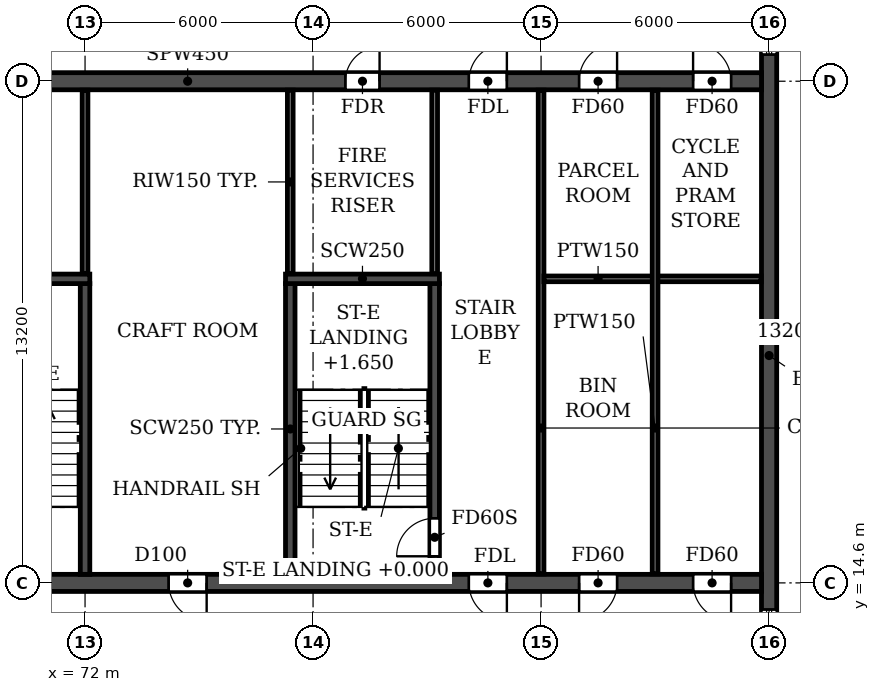
"""IFC4 building model, lengths in metres.
Left out: names, types, materials, properties, quantities, classifications, styles, units other than length and angle.
Written with IfcOpenShell. Run it as: python <this file> out.ifc"""

import sys

from ifc_helpers import new_model, si_unit, direction, frame, frame_2d, origin, place, context, subcontext, project, spatial, rectangle, extrude, element, fill, save


model = new_model("IFC4")
c1 = context("Model", 3, precision=1e-05, world=origin(), true_north=direction((0.0, 1.0)))
c2 = subcontext(c1, "Body", "Model", "MODEL_VIEW")
j1 = project(units=[si_unit("LENGTHUNIT", "METRE"), si_unit("PLANEANGLEUNIT", "RADIAN")], contexts=[c1])
p1 = place(None, origin())
s1 = spatial("IfcSite", under=j1, at=p1, CompositionType="ELEMENT")
p2 = place(p1, origin())
s2 = spatial("IfcBuilding", under=s1, at=p2, CompositionType="ELEMENT")
p3 = place(p2, frame((0.0, 0.0, 122.4)))
s3 = spatial("IfcBuildingStorey", under=s2, at=p3, CompositionType="ELEMENT", Elevation=122.4)
p4 = place(p3, frame((90.0, 4.683, 0.0), z_axis=(0.0, 0.0, 1.0), x_axis=(0.0, 1.0, 0.0)))
e1 = element("IfcWall", 1, at=p4, inside=s3, PredefinedType="SHEAR", context=c2, shape_type="SweptSolid", body=[
    extrude(rectangle(XDim=33.034, YDim=0.4, at=frame_2d((16.517, 0.0))), origin(), (0.0, 0.0, 1.0), 3.07),
])
p5 = place(p4, frame((23.817, 0.0, 0.9)))
e2 = element("IfcOpeningElement", 2, at=p5, cuts=e1, PredefinedType="OPENING", context=c2, shape_type="SweptSolid", body=[
    extrude(rectangle(XDim=1.2, YDim=1.5, at=frame_2d((0.6, 0.75))), frame((0.0, 0.21, 0.0), z_axis=(0.0, -1.0, 0.0), x_axis=(1.0, 0.0, 0.0)), (0.0, 0.0, 1.0), 0.42),
])
p6 = place(p4, frame((8.017, 0.0, 0.9)))
e3 = element("IfcOpeningElement", 3, at=p6, cuts=e1, PredefinedType="OPENING", context=c2, shape_type="SweptSolid", body=[
    extrude(rectangle(XDim=1.2, YDim=1.5, at=frame_2d((0.6, 0.75))), frame((0.0, 0.21, 0.0), z_axis=(0.0, -1.0, 0.0), x_axis=(1.0, 0.0, 0.0)), (0.0, 0.0, 1.0), 0.42),
])
p7 = place(p4, frame((28.293, 0.0, 0.6)))
e4 = element("IfcOpeningElement", 4, at=p7, cuts=e1, PredefinedType="OPENING", context=c2, shape_type="SweptSolid", body=[
    extrude(rectangle(XDim=2.2, YDim=1.8, at=frame_2d((1.1, 0.9))), frame((0.0, 0.21, 0.0), z_axis=(0.0, -1.0, 0.0), x_axis=(1.0, 0.0, 0.0)), (0.0, 0.0, 1.0), 0.42),
])
p8 = place(p4, frame((2.541, 0.0, 0.6)))
e5 = element("IfcOpeningElement", 5, at=p8, cuts=e1, PredefinedType="OPENING", context=c2, shape_type="SweptSolid", body=[
    extrude(rectangle(XDim=2.2, YDim=1.8, at=frame_2d((1.1, 0.9))), frame((0.0, 0.21, 0.0), z_axis=(0.0, -1.0, 0.0), x_axis=(1.0, 0.0, 0.0)), (0.0, 0.0, 1.0), 0.42),
])
p9 = place(p3, frame((12.2, 14.6, 0.0), z_axis=(0.0, 0.0, 1.0), x_axis=(1.0, 0.0, 0.0)))
e6 = element("IfcWall", 6, at=p9, inside=s3, PredefinedType="SOLIDWALL", context=c2, shape_type="SweptSolid", body=[
    extrude(rectangle(XDim=77.6, YDim=0.45, at=frame_2d((38.8, 0.0))), origin(), (0.0, 0.0, 1.0), 3.07),
])
p10 = place(p9, frame((0.8, 0.0, 0.0)))
e7 = element("IfcOpeningElement", 7, at=p10, cuts=e6, PredefinedType="OPENING", context=c2, shape_type="SweptSolid", body=[
    extrude(rectangle(XDim=1.0, YDim=2.1, at=frame_2d((0.5, 1.05))), frame((0.0, 0.235, 0.0), z_axis=(0.0, -1.0, 0.0), x_axis=(1.0, 0.0, 0.0)), (0.0, 0.0, 1.0), 0.47),
])
p11 = place(p9, frame((3.8, 0.0, 0.0)))
e8 = element("IfcOpeningElement", 8, at=p11, cuts=e6, PredefinedType="OPENING", context=c2, shape_type="SweptSolid", body=[
    extrude(rectangle(XDim=1.0, YDim=2.1, at=frame_2d((0.5, 1.05))), frame((0.0, 0.235, 0.0), z_axis=(0.0, -1.0, 0.0), x_axis=(1.0, 0.0, 0.0)), (0.0, 0.0, 1.0), 0.47),
])
p12 = place(p9, frame((6.7, 0.0, 0.0)))
e9 = element("IfcOpeningElement", 9, at=p12, cuts=e6, PredefinedType="OPENING", context=c2, shape_type="SweptSolid", body=[
    extrude(rectangle(XDim=1.0, YDim=2.1, at=frame_2d((0.5, 1.05))), frame((0.0, 0.235, 0.0), z_axis=(0.0, -1.0, 0.0), x_axis=(1.0, 0.0, 0.0)), (0.0, 0.0, 1.0), 0.47),
])
p13 = place(p9, frame((14.6, 0.0, 0.0)))
e10 = element("IfcOpeningElement", 10, at=p13, cuts=e6, PredefinedType="OPENING", context=c2, shape_type="SweptSolid", body=[
    extrude(rectangle(XDim=1.0, YDim=2.1, at=frame_2d((0.5, 1.05))), frame((0.0, 0.235, 0.0), z_axis=(0.0, -1.0, 0.0), x_axis=(1.0, 0.0, 0.0)), (0.0, 0.0, 1.0), 0.47),
])
p14 = place(p9, frame((19.2, 0.0, 0.0)))
e11 = element("IfcOpeningElement", 11, at=p14, cuts=e6, PredefinedType="OPENING", context=c2, shape_type="SweptSolid", body=[
    extrude(rectangle(XDim=1.0, YDim=2.1, at=frame_2d((0.5, 1.05))), frame((0.0, 0.235, 0.0), z_axis=(0.0, -1.0, 0.0), x_axis=(1.0, 0.0, 0.0)), (0.0, 0.0, 1.0), 0.47),
])
p15 = place(p9, frame((30.5, 0.0, 0.0)))
e12 = element("IfcOpeningElement", 12, at=p15, cuts=e6, PredefinedType="OPENING", context=c2, shape_type="SweptSolid", body=[
    extrude(rectangle(XDim=1.0, YDim=2.1, at=frame_2d((0.5, 1.05))), frame((0.0, 0.235, 0.0), z_axis=(0.0, -1.0, 0.0), x_axis=(1.0, 0.0, 0.0)), (0.0, 0.0, 1.0), 0.47),
])
p16 = place(p9, frame((34.4, 0.0, 0.0)))
e13 = element("IfcOpeningElement", 13, at=p16, cuts=e6, PredefinedType="OPENING", context=c2, shape_type="SweptSolid", body=[
    extrude(rectangle(XDim=1.0, YDim=2.1, at=frame_2d((0.5, 1.05))), frame((0.0, 0.235, 0.0), z_axis=(0.0, -1.0, 0.0), x_axis=(1.0, 0.0, 0.0)), (0.0, 0.0, 1.0), 0.47),
])
p17 = place(p9, frame((38.3, 0.0, 0.0)))
e14 = element("IfcOpeningElement", 14, at=p17, cuts=e6, PredefinedType="OPENING", context=c2, shape_type="SweptSolid", body=[
    extrude(rectangle(XDim=1.0, YDim=2.1, at=frame_2d((0.5, 1.05))), frame((0.0, 0.235, 0.0), z_axis=(0.0, -1.0, 0.0), x_axis=(1.0, 0.0, 0.0)), (0.0, 0.0, 1.0), 0.47),
])
p18 = place(p9, frame((40.9, 0.0, 0.0)))
e15 = element("IfcOpeningElement", 15, at=p18, cuts=e6, PredefinedType="OPENING", context=c2, shape_type="SweptSolid", body=[
    extrude(rectangle(XDim=1.0, YDim=2.1, at=frame_2d((0.5, 1.05))), frame((0.0, 0.235, 0.0), z_axis=(0.0, -1.0, 0.0), x_axis=(1.0, 0.0, 0.0)), (0.0, 0.0, 1.0), 0.47),
])
p19 = place(p9, frame((44.8, 0.0, 0.0)))
e16 = element("IfcOpeningElement", 16, at=p19, cuts=e6, PredefinedType="OPENING", context=c2, shape_type="SweptSolid", body=[
    extrude(rectangle(XDim=1.0, YDim=2.1, at=frame_2d((0.5, 1.05))), frame((0.0, 0.235, 0.0), z_axis=(0.0, -1.0, 0.0), x_axis=(1.0, 0.0, 0.0)), (0.0, 0.0, 1.0), 0.47),
])
p20 = place(p9, frame((57.4, 0.0, 0.0)))
e17 = element("IfcOpeningElement", 17, at=p20, cuts=e6, PredefinedType="OPENING", context=c2, shape_type="SweptSolid", body=[
    extrude(rectangle(XDim=1.0, YDim=2.1, at=frame_2d((0.5, 1.05))), frame((0.0, 0.235, 0.0), z_axis=(0.0, -1.0, 0.0), x_axis=(1.0, 0.0, 0.0)), (0.0, 0.0, 1.0), 0.47),
])
p21 = place(p9, frame((62.0, 0.0, 0.0)))
e18 = element("IfcOpeningElement", 18, at=p21, cuts=e6, PredefinedType="OPENING", context=c2, shape_type="SweptSolid", body=[
    extrude(rectangle(XDim=1.0, YDim=2.1, at=frame_2d((0.5, 1.05))), frame((0.0, 0.235, 0.0), z_axis=(0.0, -1.0, 0.0), x_axis=(1.0, 0.0, 0.0)), (0.0, 0.0, 1.0), 0.47),
])
p22 = place(p9, frame((69.9, 0.0, 0.0)))
e19 = element("IfcOpeningElement", 19, at=p22, cuts=e6, PredefinedType="OPENING", context=c2, shape_type="SweptSolid", body=[
    extrude(rectangle(XDim=1.0, YDim=2.1, at=frame_2d((0.5, 1.05))), frame((0.0, 0.235, 0.0), z_axis=(0.0, -1.0, 0.0), x_axis=(1.0, 0.0, 0.0)), (0.0, 0.0, 1.0), 0.47),
])
p23 = place(p9, frame((72.8, 0.0, 0.0)))
e20 = element("IfcOpeningElement", 20, at=p23, cuts=e6, PredefinedType="OPENING", context=c2, shape_type="SweptSolid", body=[
    extrude(rectangle(XDim=1.0, YDim=2.1, at=frame_2d((0.5, 1.05))), frame((0.0, 0.235, 0.0), z_axis=(0.0, -1.0, 0.0), x_axis=(1.0, 0.0, 0.0)), (0.0, 0.0, 1.0), 0.47),
])
p24 = place(p9, frame((75.8, 0.0, 0.0)))
e21 = element("IfcOpeningElement", 21, at=p24, cuts=e6, PredefinedType="OPENING", context=c2, shape_type="SweptSolid", body=[
    extrude(rectangle(XDim=1.0, YDim=2.1, at=frame_2d((0.5, 1.05))), frame((0.0, 0.235, 0.0), z_axis=(0.0, -1.0, 0.0), x_axis=(1.0, 0.0, 0.0)), (0.0, 0.0, 1.0), 0.47),
])
p25 = place(p3, frame((12.2, 27.8, 0.0), z_axis=(0.0, 0.0, 1.0), x_axis=(1.0, 0.0, 0.0)))
e22 = element("IfcWall", 22, at=p25, inside=s3, PredefinedType="SOLIDWALL", context=c2, shape_type="SweptSolid", body=[
    extrude(rectangle(XDim=77.6, YDim=0.45, at=frame_2d((38.8, 0.0))), origin(), (0.0, 0.0, 1.0), 3.07),
])
p26 = place(p25, frame((0.8, 0.0, 0.0)))
e23 = element("IfcOpeningElement", 23, at=p26, cuts=e22, PredefinedType="OPENING", context=c2, shape_type="SweptSolid", body=[
    extrude(rectangle(XDim=1.0, YDim=2.1, at=frame_2d((0.5, 1.05))), frame((0.0, 0.235, 0.0), z_axis=(0.0, -1.0, 0.0), x_axis=(1.0, 0.0, 0.0)), (0.0, 0.0, 1.0), 0.47),
])
p27 = place(p25, frame((3.8, 0.0, 0.0)))
e24 = element("IfcOpeningElement", 24, at=p27, cuts=e22, PredefinedType="OPENING", context=c2, shape_type="SweptSolid", body=[
    extrude(rectangle(XDim=1.0, YDim=2.1, at=frame_2d((0.5, 1.05))), frame((0.0, 0.235, 0.0), z_axis=(0.0, -1.0, 0.0), x_axis=(1.0, 0.0, 0.0)), (0.0, 0.0, 1.0), 0.47),
])
p28 = place(p25, frame((6.7, 0.0, 0.0)))
e25 = element("IfcOpeningElement", 25, at=p28, cuts=e22, PredefinedType="OPENING", context=c2, shape_type="SweptSolid", body=[
    extrude(rectangle(XDim=1.0, YDim=2.1, at=frame_2d((0.5, 1.05))), frame((0.0, 0.235, 0.0), z_axis=(0.0, -1.0, 0.0), x_axis=(1.0, 0.0, 0.0)), (0.0, 0.0, 1.0), 0.47),
])
p29 = place(p25, frame((10.05, 0.0, 0.0)))
e26 = element("IfcOpeningElement", 26, at=p29, cuts=e22, PredefinedType="OPENING", context=c2, shape_type="SweptSolid", body=[
    extrude(rectangle(XDim=0.9, YDim=2.1, at=frame_2d((0.45, 1.05))), frame((0.0, 0.235, 0.0), z_axis=(0.0, -1.0, 0.0), x_axis=(1.0, 0.0, 0.0)), (0.0, 0.0, 1.0), 0.47),
])
p30 = place(p25, frame((19.25, 0.0, 0.0)))
e27 = element("IfcOpeningElement", 27, at=p30, cuts=e22, PredefinedType="OPENING", context=c2, shape_type="SweptSolid", body=[
    extrude(rectangle(XDim=0.9, YDim=2.1, at=frame_2d((0.45, 1.05))), frame((0.0, 0.235, 0.0), z_axis=(0.0, -1.0, 0.0), x_axis=(1.0, 0.0, 0.0)), (0.0, 0.0, 1.0), 0.47),
])
p31 = place(p25, frame((25.0, 0.0, 0.0)))
e28 = element("IfcOpeningElement", 28, at=p31, cuts=e22, PredefinedType="OPENING", context=c2, shape_type="SweptSolid", body=[
    extrude(rectangle(XDim=1.0, YDim=2.1, at=frame_2d((0.5, 1.05))), frame((0.0, 0.235, 0.0), z_axis=(0.0, -1.0, 0.0), x_axis=(1.0, 0.0, 0.0)), (0.0, 0.0, 1.0), 0.47),
])
p32 = place(p25, frame((30.2, 0.0, 0.0)))
e29 = element("IfcOpeningElement", 29, at=p32, cuts=e22, PredefinedType="OPENING", context=c2, shape_type="SweptSolid", body=[
    extrude(rectangle(XDim=1.0, YDim=2.1, at=frame_2d((0.5, 1.05))), frame((0.0, 0.235, 0.0), z_axis=(0.0, -1.0, 0.0), x_axis=(1.0, 0.0, 0.0)), (0.0, 0.0, 1.0), 0.47),
])
p33 = place(p25, frame((35.4, 0.0, 0.0)))
e30 = element("IfcOpeningElement", 30, at=p33, cuts=e22, PredefinedType="OPENING", context=c2, shape_type="SweptSolid", body=[
    extrude(rectangle(XDim=1.0, YDim=2.1, at=frame_2d((0.5, 1.05))), frame((0.0, 0.235, 0.0), z_axis=(0.0, -1.0, 0.0), x_axis=(1.0, 0.0, 0.0)), (0.0, 0.0, 1.0), 0.47),
])
p34 = place(p25, frame((38.3, 0.0, 0.0)))
e31 = element("IfcOpeningElement", 31, at=p34, cuts=e22, PredefinedType="OPENING", context=c2, shape_type="SweptSolid", body=[
    extrude(rectangle(XDim=1.0, YDim=2.1, at=frame_2d((0.5, 1.05))), frame((0.0, 0.235, 0.0), z_axis=(0.0, -1.0, 0.0), x_axis=(1.0, 0.0, 0.0)), (0.0, 0.0, 1.0), 0.47),
])
p35 = place(p25, frame((41.2, 0.0, 0.0)))
e32 = element("IfcOpeningElement", 32, at=p35, cuts=e22, PredefinedType="OPENING", context=c2, shape_type="SweptSolid", body=[
    extrude(rectangle(XDim=1.0, YDim=2.1, at=frame_2d((0.5, 1.05))), frame((0.0, 0.235, 0.0), z_axis=(0.0, -1.0, 0.0), x_axis=(1.0, 0.0, 0.0)), (0.0, 0.0, 1.0), 0.47),
])
p36 = place(p25, frame((46.4, 0.0, 0.0)))
e33 = element("IfcOpeningElement", 33, at=p36, cuts=e22, PredefinedType="OPENING", context=c2, shape_type="SweptSolid", body=[
    extrude(rectangle(XDim=1.0, YDim=2.1, at=frame_2d((0.5, 1.05))), frame((0.0, 0.235, 0.0), z_axis=(0.0, -1.0, 0.0), x_axis=(1.0, 0.0, 0.0)), (0.0, 0.0, 1.0), 0.47),
])
p37 = place(p25, frame((51.6, 0.0, 0.0)))
e34 = element("IfcOpeningElement", 34, at=p37, cuts=e22, PredefinedType="OPENING", context=c2, shape_type="SweptSolid", body=[
    extrude(rectangle(XDim=1.0, YDim=2.1, at=frame_2d((0.5, 1.05))), frame((0.0, 0.235, 0.0), z_axis=(0.0, -1.0, 0.0), x_axis=(1.0, 0.0, 0.0)), (0.0, 0.0, 1.0), 0.47),
])
p38 = place(p25, frame((54.2, 0.0, 0.0)))
e35 = element("IfcOpeningElement", 35, at=p38, cuts=e22, PredefinedType="OPENING", context=c2, shape_type="SweptSolid", body=[
    extrude(rectangle(XDim=1.0, YDim=2.1, at=frame_2d((0.5, 1.05))), frame((0.0, 0.235, 0.0), z_axis=(0.0, -1.0, 0.0), x_axis=(1.0, 0.0, 0.0)), (0.0, 0.0, 1.0), 0.47),
])
p39 = place(p25, frame((57.45, 0.0, 0.0)))
e36 = element("IfcOpeningElement", 36, at=p39, cuts=e22, PredefinedType="OPENING", context=c2, shape_type="SweptSolid", body=[
    extrude(rectangle(XDim=0.9, YDim=2.1, at=frame_2d((0.45, 1.05))), frame((0.0, 0.235, 0.0), z_axis=(0.0, -1.0, 0.0), x_axis=(1.0, 0.0, 0.0)), (0.0, 0.0, 1.0), 0.47),
])
p40 = place(p25, frame((66.65, 0.0, 0.0)))
e37 = element("IfcOpeningElement", 37, at=p40, cuts=e22, PredefinedType="OPENING", context=c2, shape_type="SweptSolid", body=[
    extrude(rectangle(XDim=0.9, YDim=2.1, at=frame_2d((0.45, 1.05))), frame((0.0, 0.235, 0.0), z_axis=(0.0, -1.0, 0.0), x_axis=(1.0, 0.0, 0.0)), (0.0, 0.0, 1.0), 0.47),
])
p41 = place(p25, frame((69.9, 0.0, 0.0)))
e38 = element("IfcOpeningElement", 38, at=p41, cuts=e22, PredefinedType="OPENING", context=c2, shape_type="SweptSolid", body=[
    extrude(rectangle(XDim=1.0, YDim=2.1, at=frame_2d((0.5, 1.05))), frame((0.0, 0.235, 0.0), z_axis=(0.0, -1.0, 0.0), x_axis=(1.0, 0.0, 0.0)), (0.0, 0.0, 1.0), 0.47),
])
p42 = place(p25, frame((72.8, 0.0, 0.0)))
e39 = element("IfcOpeningElement", 39, at=p42, cuts=e22, PredefinedType="OPENING", context=c2, shape_type="SweptSolid", body=[
    extrude(rectangle(XDim=1.0, YDim=2.1, at=frame_2d((0.5, 1.05))), frame((0.0, 0.235, 0.0), z_axis=(0.0, -1.0, 0.0), x_axis=(1.0, 0.0, 0.0)), (0.0, 0.0, 1.0), 0.47),
])
p43 = place(p25, frame((75.8, 0.0, 0.0)))
e40 = element("IfcOpeningElement", 40, at=p43, cuts=e22, PredefinedType="OPENING", context=c2, shape_type="SweptSolid", body=[
    extrude(rectangle(XDim=1.0, YDim=2.1, at=frame_2d((0.5, 1.05))), frame((0.0, 0.235, 0.0), z_axis=(0.0, -1.0, 0.0), x_axis=(1.0, 0.0, 0.0)), (0.0, 0.0, 1.0), 0.47),
])
p44 = place(p3, frame((72.0, 14.825, 0.0), z_axis=(0.0, 0.0, 1.0), x_axis=(0.0, 1.0, 0.0)))
e41 = element("IfcWall", 41, at=p44, inside=s3, PredefinedType="SOLIDWALL", context=c2, shape_type="SweptSolid", body=[
    extrude(rectangle(XDim=7.65, YDim=0.25, at=frame_2d((3.825, 0.0))), origin(), (0.0, 0.0, 1.0), 3.07),
])
p45 = place(p3, frame((68.075, 22.6, 0.0), z_axis=(0.0, 0.0, 1.0), x_axis=(1.0, 0.0, 0.0)))
e42 = element("IfcWall", 42, at=p45, inside=s3, PredefinedType="SOLIDWALL", context=c2, shape_type="SweptSolid", body=[
    extrude(rectangle(XDim=4.05, YDim=0.25, at=frame_2d((2.025, 0.0))), origin(), (0.0, 0.0, 1.0), 3.07),
])
p46 = place(p3, frame((77.4, 14.825, 0.0), z_axis=(0.0, 0.0, 1.0), x_axis=(0.0, 1.0, 0.0)))
e43 = element("IfcWall", 43, at=p46, inside=s3, PredefinedType="SOLIDWALL", context=c2, shape_type="SweptSolid", body=[
    extrude(rectangle(XDim=7.65, YDim=0.25, at=frame_2d((3.825, 0.0))), origin(), (0.0, 0.0, 1.0), 3.07),
])
p47 = place(p3, frame((81.2, 14.825, 0.0), z_axis=(0.0, 0.0, 1.0), x_axis=(0.0, 1.0, 0.0)))
e44 = element("IfcWall", 44, at=p47, inside=s3, PredefinedType="SOLIDWALL", context=c2, shape_type="SweptSolid", body=[
    extrude(rectangle(XDim=7.65, YDim=0.25, at=frame_2d((3.825, 0.0))), origin(), (0.0, 0.0, 1.0), 3.07),
])
p48 = place(p47, frame((0.475, 0.0, 0.0)))
e45 = element("IfcOpeningElement", 45, at=p48, cuts=e44, PredefinedType="OPENING", context=c2, shape_type="SweptSolid", body=[
    extrude(rectangle(XDim=1.0, YDim=2.1, at=frame_2d((0.5, 1.05))), frame((0.0, 0.135, 0.0), z_axis=(0.0, -1.0, 0.0), x_axis=(1.0, 0.0, 0.0)), (0.0, 0.0, 1.0), 0.27),
])
p49 = place(p3, frame((77.275, 22.6, 0.0), z_axis=(0.0, 0.0, 1.0), x_axis=(1.0, 0.0, 0.0)))
e46 = element("IfcWall", 46, at=p49, inside=s3, PredefinedType="SOLIDWALL", context=c2, shape_type="SweptSolid", body=[
    extrude(rectangle(XDim=4.05, YDim=0.25, at=frame_2d((2.025, 0.0))), origin(), (0.0, 0.0, 1.0), 3.07),
])
p50 = place(p3, frame((84.0, 14.835, 0.0), z_axis=(0.0, 0.0, 1.0), x_axis=(0.0, 1.0, 0.0)))
e47 = element("IfcWall", 47, at=p50, inside=s3, PredefinedType="PARTITIONING", context=c2, shape_type="SweptSolid", body=[
    extrude(rectangle(XDim=12.73, YDim=0.15, at=frame_2d((6.365, 0.0))), origin(), (0.0, 0.0, 1.0), 3.07),
])
p51 = place(p3, frame((84.075, 22.6, 0.0), z_axis=(0.0, 0.0, 1.0), x_axis=(1.0, 0.0, 0.0)))
e48 = element("IfcWall", 48, at=p51, inside=s3, PredefinedType="PARTITIONING", context=c2, shape_type="SweptSolid", body=[
    extrude(rectangle(XDim=5.715, YDim=0.15, at=frame_2d((2.857, 0.0))), origin(), (0.0, 0.0, 1.0), 3.07),
])
p52 = place(p3, frame((87.0, 14.835, 0.0), z_axis=(0.0, 0.0, 1.0), x_axis=(0.0, 1.0, 0.0)))
e49 = element("IfcWall", 49, at=p52, inside=s3, PredefinedType="PARTITIONING", context=c2, shape_type="SweptSolid", body=[
    extrude(rectangle(XDim=12.73, YDim=0.15, at=frame_2d((6.365, 0.0))), origin(), (0.0, 0.0, 1.0), 3.07),
])
for number, where, z_axis, x_axis in (
    (50, (72.0, 22.735, 0.0), (0.0, 0.0, 1.0), (0.0, 1.0, 0.0)),
    (51, (77.4, 22.735, 0.0), (0.0, 0.0, 1.0), (0.0, 1.0, 0.0)),
    (52, (81.2, 22.735, 0.0), (0.0, 0.0, 1.0), (0.0, 1.0, 0.0)),
):
    element("IfcWall", number, at=place(p3, frame(where, z_axis=z_axis, x_axis=x_axis)), inside=s3, PredefinedType="PARTITIONING", context=c2, shape_type="SweptSolid", body=[
        extrude(rectangle(XDim=4.83, YDim=0.15, at=frame_2d((2.415, 0.0))), origin(), (0.0, 0.0, 1.0), 3.07),
    ])
p53 = place(p5, origin())
e53 = element("IfcWindow", 53, at=p53, inside=s3, PartitioningType="SINGLE_PANEL", PredefinedType="WINDOW", context=c2, shape_type="SweptSolid", body=[
    extrude(rectangle(XDim=1.2, YDim=1.5, at=frame_2d((0.6, 0.75))), frame((0.0, 0.03, 0.0), z_axis=(0.0, -1.0, 0.0), x_axis=(1.0, 0.0, 0.0)), (0.0, 0.0, 1.0), 0.06),
])
fill(e2, e53)
p54 = place(p6, origin())
e54 = element("IfcWindow", 54, at=p54, inside=s3, PartitioningType="SINGLE_PANEL", PredefinedType="WINDOW", context=c2, shape_type="SweptSolid", body=[
    extrude(rectangle(XDim=1.2, YDim=1.5, at=frame_2d((0.6, 0.75))), frame((0.0, 0.03, 0.0), z_axis=(0.0, -1.0, 0.0), x_axis=(1.0, 0.0, 0.0)), (0.0, 0.0, 1.0), 0.06),
])
fill(e3, e54)
p55 = place(p40, origin())
e55 = element("IfcDoor", 55, at=p55, inside=s3, OperationType="SINGLE_SWING_RIGHT", PredefinedType="DOOR", context=c2, shape_type="SweptSolid", body=[
    extrude(rectangle(XDim=0.9, YDim=2.1, at=frame_2d((0.45, 1.05))), frame((0.0, 0.025, 0.0), z_axis=(0.0, -1.0, 0.0), x_axis=(1.0, 0.0, 0.0)), (0.0, 0.0, 1.0), 0.05),
])
fill(e37, e55)
p56 = place(p41, origin())
e56 = element("IfcDoor", 56, at=p56, inside=s3, OperationType="SINGLE_SWING_RIGHT", PredefinedType="DOOR", context=c2, shape_type="SweptSolid", body=[
    extrude(rectangle(XDim=1.0, YDim=2.1, at=frame_2d((0.5, 1.05))), frame((0.0, 0.025, 0.0), z_axis=(0.0, -1.0, 0.0), x_axis=(1.0, 0.0, 0.0)), (0.0, 0.0, 1.0), 0.05),
])
fill(e38, e56)
p57 = place(p42, origin())
e57 = element("IfcDoor", 57, at=p57, inside=s3, OperationType="SINGLE_SWING_RIGHT", PredefinedType="DOOR", context=c2, shape_type="SweptSolid", body=[
    extrude(rectangle(XDim=1.0, YDim=2.1, at=frame_2d((0.5, 1.05))), frame((0.0, 0.025, 0.0), z_axis=(0.0, -1.0, 0.0), x_axis=(1.0, 0.0, 0.0)), (0.0, 0.0, 1.0), 0.05),
])
fill(e39, e57)
p58 = place(p43, origin())
e58 = element("IfcDoor", 58, at=p58, inside=s3, OperationType="SINGLE_SWING_LEFT", PredefinedType="DOOR", context=c2, shape_type="SweptSolid", body=[
    extrude(rectangle(XDim=1.0, YDim=2.1, at=frame_2d((0.5, 1.05))), frame((0.0, 0.025, 0.0), z_axis=(0.0, -1.0, 0.0), x_axis=(1.0, 0.0, 0.0)), (0.0, 0.0, 1.0), 0.05),
])
fill(e40, e58)
p59 = place(p21, frame((1.0, 0.0, 0.0), z_axis=(0.0, 0.0, 1.0), x_axis=(-1.0, 0.0, 0.0)))
e59 = element("IfcDoor", 59, at=p59, inside=s3, OperationType="SINGLE_SWING_LEFT", PredefinedType="DOOR", context=c2, shape_type="SweptSolid", body=[
    extrude(rectangle(XDim=1.0, YDim=2.1, at=frame_2d((0.5, 1.05))), frame((0.0, 0.025, 0.0), z_axis=(0.0, -1.0, 0.0), x_axis=(1.0, 0.0, 0.0)), (0.0, 0.0, 1.0), 0.05),
])
fill(e18, e59)
p60 = place(p22, frame((1.0, 0.0, 0.0), z_axis=(0.0, 0.0, 1.0), x_axis=(-1.0, 0.0, 0.0)))
e60 = element("IfcDoor", 60, at=p60, inside=s3, OperationType="SINGLE_SWING_LEFT", PredefinedType="DOOR", context=c2, shape_type="SweptSolid", body=[
    extrude(rectangle(XDim=1.0, YDim=2.1, at=frame_2d((0.5, 1.05))), frame((0.0, 0.025, 0.0), z_axis=(0.0, -1.0, 0.0), x_axis=(1.0, 0.0, 0.0)), (0.0, 0.0, 1.0), 0.05),
])
fill(e19, e60)
p61 = place(p23, frame((1.0, 0.0, 0.0), z_axis=(0.0, 0.0, 1.0), x_axis=(-1.0, 0.0, 0.0)))
e61 = element("IfcDoor", 61, at=p61, inside=s3, OperationType="SINGLE_SWING_RIGHT", PredefinedType="DOOR", context=c2, shape_type="SweptSolid", body=[
    extrude(rectangle(XDim=1.0, YDim=2.1, at=frame_2d((0.5, 1.05))), frame((0.0, 0.025, 0.0), z_axis=(0.0, -1.0, 0.0), x_axis=(1.0, 0.0, 0.0)), (0.0, 0.0, 1.0), 0.05),
])
fill(e20, e61)
p62 = place(p24, frame((1.0, 0.0, 0.0), z_axis=(0.0, 0.0, 1.0), x_axis=(-1.0, 0.0, 0.0)))
e62 = element("IfcDoor", 62, at=p62, inside=s3, OperationType="SINGLE_SWING_LEFT", PredefinedType="DOOR", context=c2, shape_type="SweptSolid", body=[
    extrude(rectangle(XDim=1.0, YDim=2.1, at=frame_2d((0.5, 1.05))), frame((0.0, 0.025, 0.0), z_axis=(0.0, -1.0, 0.0), x_axis=(1.0, 0.0, 0.0)), (0.0, 0.0, 1.0), 0.05),
])
fill(e21, e62)
p63 = place(p48, origin())
e63 = element("IfcDoor", 63, at=p63, inside=s3, OperationType="SINGLE_SWING_LEFT", PredefinedType="DOOR", context=c2, shape_type="SweptSolid", body=[
    extrude(rectangle(XDim=1.0, YDim=2.1, at=frame_2d((0.5, 1.05))), frame((0.0, 0.025, 0.0), z_axis=(0.0, -1.0, 0.0), x_axis=(1.0, 0.0, 0.0)), (0.0, 0.0, 1.0), 0.05),
])
fill(e45, e63)
save(model, sys.argv[1])
